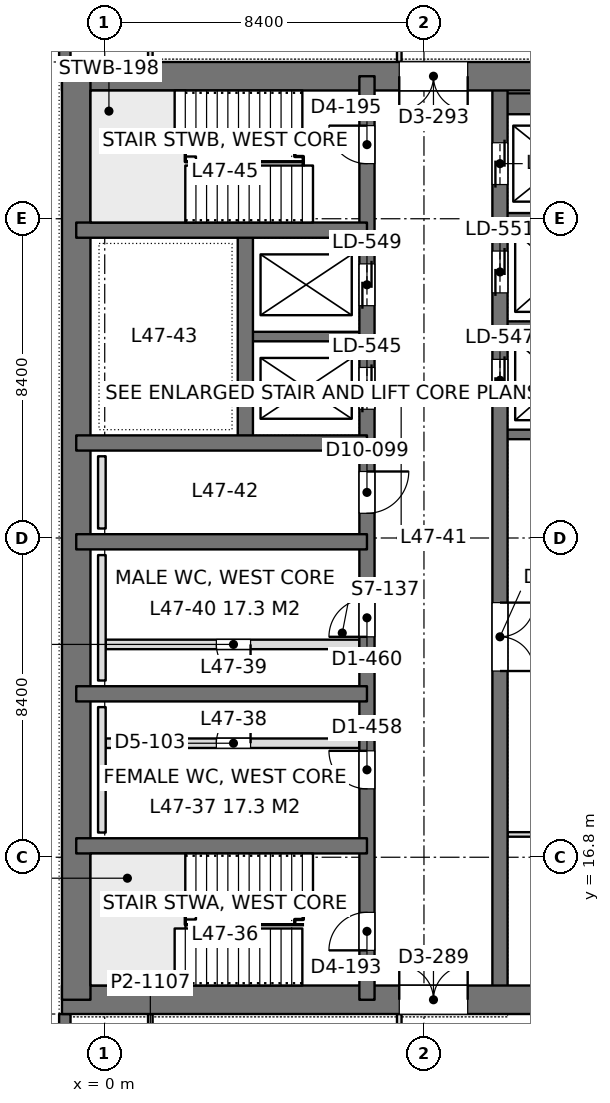
"""IFC4 building model, lengths in metres.
Left out: names, types, materials, properties, quantities, classifications, styles, units other than length and angle.
Written with IfcOpenShell. Run it as: python <this file> out.ifc"""

import sys

from ifc_helpers import new_model, si_unit, direction, frame, frame_2d, origin, place, context, subcontext, project, spatial, rectangle, extrude, element, fill, save


model = new_model("IFC4")
c1 = context("Model", 3, precision=1e-05, world=origin(), true_north=direction((0.0, 1.0)))
c2 = subcontext(c1, "Body", "Model", "MODEL_VIEW")
j1 = project(units=[si_unit("LENGTHUNIT", "METRE"), si_unit("PLANEANGLEUNIT", "RADIAN")], contexts=[c1])
p1 = place(None, origin())
s1 = spatial("IfcSite", under=j1, at=p1, CompositionType="ELEMENT")
p2 = place(p1, origin())
s2 = spatial("IfcBuilding", under=s1, at=p2, CompositionType="ELEMENT")
p3 = place(p2, frame((0.0, 0.0, 207.0)))
s3 = spatial("IfcBuildingStorey", under=s2, at=p3, CompositionType="ELEMENT", Elevation=207.0)
p4 = place(p3, frame((-1.125, 13.05, 0.0), z_axis=(0.0, 0.0, 1.0), x_axis=(1.0, 0.0, 0.0)))
e1 = element("IfcWall", 1, at=p4, inside=s3, PredefinedType="SHEAR", context=c2, shape_type="SweptSolid", body=[
    extrude(rectangle(XDim=17.85, YDim=0.75, at=frame_2d((8.925, 0.0))), origin(), (0.0, 0.0, 1.0), 4.2),
])
p5 = place(p4, frame((8.875, 0.0, 0.0)))
e2 = element("IfcOpeningElement", 2, at=p5, cuts=e1, PredefinedType="OPENING", context=c2, shape_type="SweptSolid", body=[
    extrude(rectangle(XDim=1.8, YDim=2.4, at=frame_2d((0.9, 1.2))), frame((0.0, 0.385, 0.0), z_axis=(0.0, -1.0, 0.0), x_axis=(1.0, 0.0, 0.0)), (0.0, 0.0, 1.0), 0.77),
])
p6 = place(p3, frame((-1.125, 37.35, 0.0), z_axis=(0.0, 0.0, 1.0), x_axis=(1.0, 0.0, 0.0)))
e3 = element("IfcWall", 3, at=p6, inside=s3, PredefinedType="SHEAR", context=c2, shape_type="SweptSolid", body=[
    extrude(rectangle(XDim=17.85, YDim=0.75, at=frame_2d((8.925, 0.0))), origin(), (0.0, 0.0, 1.0), 4.2),
])
p7 = place(p6, frame((8.875, 0.0, 0.0)))
e4 = element("IfcOpeningElement", 4, at=p7, cuts=e3, PredefinedType="OPENING", context=c2, shape_type="SweptSolid", body=[
    extrude(rectangle(XDim=1.8, YDim=2.4, at=frame_2d((0.9, 1.2))), frame((0.0, 0.385, 0.0), z_axis=(0.0, -1.0, 0.0), x_axis=(1.0, 0.0, 0.0)), (0.0, 0.0, 1.0), 0.77),
])
p8 = place(p3, frame((-0.75, 13.05, 0.0), z_axis=(0.0, 0.0, 1.0), x_axis=(0.0, 1.0, 0.0)))
e5 = element("IfcWall", 5, at=p8, inside=s3, PredefinedType="SHEAR", context=c2, shape_type="SweptSolid", body=[
    extrude(rectangle(XDim=24.3, YDim=0.75, at=frame_2d((12.15, 0.0))), origin(), (0.0, 0.0, 1.0), 4.2),
])
p9 = place(p3, frame((6.9, 13.05, 0.0), z_axis=(0.0, 0.0, 1.0), x_axis=(0.0, 1.0, 0.0)))
e6 = element("IfcWall", 6, at=p9, inside=s3, PredefinedType="SHEAR", context=c2, shape_type="SweptSolid", body=[
    extrude(rectangle(XDim=24.3, YDim=0.4, at=frame_2d((12.15, 0.0))), origin(), (0.0, 0.0, 1.0), 4.2),
])
p10 = place(p9, frame((1.3, 0.0, 0.0)))
e7 = element("IfcOpeningElement", 7, at=p10, cuts=e6, PredefinedType="OPENING", context=c2, shape_type="SweptSolid", body=[
    extrude(rectangle(XDim=1.0, YDim=2.2, at=frame_2d((0.5, 1.1))), frame((0.0, 0.21, 0.0), z_axis=(0.0, -1.0, 0.0), x_axis=(1.0, 0.0, 0.0)), (0.0, 0.0, 1.0), 0.42),
])
p11 = place(p9, frame((22.0, 0.0, 0.0)))
e8 = element("IfcOpeningElement", 8, at=p11, cuts=e6, PredefinedType="OPENING", context=c2, shape_type="SweptSolid", body=[
    extrude(rectangle(XDim=1.0, YDim=2.2, at=frame_2d((0.5, 1.1))), frame((0.0, 0.21, 0.0), z_axis=(0.0, -1.0, 0.0), x_axis=(1.0, 0.0, 0.0)), (0.0, 0.0, 1.0), 0.42),
])
p12 = place(p9, frame((5.55, 0.0, 0.0)))
e9 = element("IfcOpeningElement", 9, at=p12, cuts=e6, PredefinedType="OPENING", context=c2, shape_type="SweptSolid", body=[
    extrude(rectangle(XDim=1.0, YDim=2.2, at=frame_2d((0.5, 1.1))), frame((0.0, 0.21, 0.0), z_axis=(0.0, -1.0, 0.0), x_axis=(1.0, 0.0, 0.0)), (0.0, 0.0, 1.0), 0.42),
])
p13 = place(p9, frame((9.55, 0.0, 0.0)))
e10 = element("IfcOpeningElement", 10, at=p13, cuts=e6, PredefinedType="OPENING", context=c2, shape_type="SweptSolid", body=[
    extrude(rectangle(XDim=1.0, YDim=2.2, at=frame_2d((0.5, 1.1))), frame((0.0, 0.21, 0.0), z_axis=(0.0, -1.0, 0.0), x_axis=(1.0, 0.0, 0.0)), (0.0, 0.0, 1.0), 0.42),
])
p14 = place(p9, frame((12.8, 0.0, 0.0)))
e11 = element("IfcOpeningElement", 11, at=p14, cuts=e6, PredefinedType="OPENING", context=c2, shape_type="SweptSolid", body=[
    extrude(rectangle(XDim=1.1, YDim=2.2, at=frame_2d((0.55, 1.1))), frame((0.0, 0.21, 0.0), z_axis=(0.0, -1.0, 0.0), x_axis=(1.0, 0.0, 0.0)), (0.0, 0.0, 1.0), 0.42),
])
p15 = place(p9, frame((15.538, 0.0, 0.0)))
e12 = element("IfcOpeningElement", 12, at=p15, cuts=e6, PredefinedType="OPENING", context=c2, shape_type="SweptSolid", body=[
    extrude(rectangle(XDim=1.1, YDim=2.2, at=frame_2d((0.55, 1.1))), frame((0.0, 0.21, 0.0), z_axis=(0.0, -1.0, 0.0), x_axis=(1.0, 0.0, 0.0)), (0.0, 0.0, 1.0), 0.42),
])
p16 = place(p9, frame((18.262, 0.0, 0.0)))
e13 = element("IfcOpeningElement", 13, at=p16, cuts=e6, PredefinedType="OPENING", context=c2, shape_type="SweptSolid", body=[
    extrude(rectangle(XDim=1.1, YDim=2.2, at=frame_2d((0.55, 1.1))), frame((0.0, 0.21, 0.0), z_axis=(0.0, -1.0, 0.0), x_axis=(1.0, 0.0, 0.0)), (0.0, 0.0, 1.0), 0.42),
])
p17 = place(p3, frame((10.4, 13.05, 0.0), z_axis=(0.0, 0.0, 1.0), x_axis=(0.0, 1.0, 0.0)))
e14 = element("IfcWall", 14, at=p17, inside=s3, PredefinedType="SHEAR", context=c2, shape_type="SweptSolid", body=[
    extrude(rectangle(XDim=24.3, YDim=0.4, at=frame_2d((12.15, 0.0))), origin(), (0.0, 0.0, 1.0), 4.2),
])
p18 = place(p17, frame((15.75, 0.0, 0.0)))
e15 = element("IfcOpeningElement", 15, at=p18, cuts=e14, PredefinedType="OPENING", context=c2, shape_type="SweptSolid", body=[
    extrude(rectangle(XDim=1.1, YDim=2.2, at=frame_2d((0.55, 1.1))), frame((0.0, 0.21, 0.0), z_axis=(0.0, -1.0, 0.0), x_axis=(1.0, 0.0, 0.0)), (0.0, 0.0, 1.0), 0.42),
])
p19 = place(p17, frame((18.6, 0.0, 0.0)))
e16 = element("IfcOpeningElement", 16, at=p19, cuts=e14, PredefinedType="OPENING", context=c2, shape_type="SweptSolid", body=[
    extrude(rectangle(XDim=1.1, YDim=2.2, at=frame_2d((0.55, 1.1))), frame((0.0, 0.21, 0.0), z_axis=(0.0, -1.0, 0.0), x_axis=(1.0, 0.0, 0.0)), (0.0, 0.0, 1.0), 0.42),
])
p20 = place(p17, frame((21.45, 0.0, 0.0)))
e17 = element("IfcOpeningElement", 17, at=p20, cuts=e14, PredefinedType="OPENING", context=c2, shape_type="SweptSolid", body=[
    extrude(rectangle(XDim=1.1, YDim=2.2, at=frame_2d((0.55, 1.1))), frame((0.0, 0.21, 0.0), z_axis=(0.0, -1.0, 0.0), x_axis=(1.0, 0.0, 0.0)), (0.0, 0.0, 1.0), 0.42),
])
p21 = place(p17, frame((8.65, 0.0, 0.0)))
e18 = element("IfcOpeningElement", 18, at=p21, cuts=e14, PredefinedType="OPENING", context=c2, shape_type="SweptSolid", body=[
    extrude(rectangle(XDim=1.8, YDim=2.4, at=frame_2d((0.9, 1.2))), frame((0.0, 0.21, 0.0), z_axis=(0.0, -1.0, 0.0), x_axis=(1.0, 0.0, 0.0)), (0.0, 0.0, 1.0), 0.42),
])
for number, where, z_axis, x_axis in (
    (19, (-0.75, 17.1, 0.0), (0.0, 0.0, 1.0), (1.0, 0.0, 0.0)),
    (20, (-0.75, 21.1, 0.0), (0.0, 0.0, 1.0), (1.0, 0.0, 0.0)),
    (21, (-0.75, 25.1, 0.0), (0.0, 0.0, 1.0), (1.0, 0.0, 0.0)),
    (22, (-0.75, 27.7, 0.0), (0.0, 0.0, 1.0), (1.0, 0.0, 0.0)),
    (23, (-0.75, 33.3, 0.0), (0.0, 0.0, 1.0), (1.0, 0.0, 0.0)),
):
    element("IfcWall", number, at=place(p3, frame(where, z_axis=z_axis, x_axis=x_axis)), inside=s3, PredefinedType="SHEAR", context=c2, shape_type="SweptSolid", body=[
        extrude(rectangle(XDim=7.65, YDim=0.4, at=frame_2d((3.825, 0.0))), origin(), (0.0, 0.0, 1.0), 4.2),
    ])
p22 = place(p3, frame((3.7, 27.7, 0.0), z_axis=(0.0, 0.0, 1.0), x_axis=(0.0, 1.0, 0.0)))
e24 = element("IfcWall", 24, at=p22, inside=s3, PredefinedType="SHEAR", context=c2, shape_type="SweptSolid", body=[
    extrude(rectangle(XDim=5.6, YDim=0.4, at=frame_2d((2.8, 0.0))), origin(), (0.0, 0.0, 1.0), 4.2),
])
p23 = place(p3, frame((3.7, 30.5, 0.0), z_axis=(0.0, 0.0, 1.0), x_axis=(1.0, 0.0, 0.0)))
e25 = element("IfcWall", 25, at=p23, inside=s3, PredefinedType="SHEAR", context=c2, shape_type="SweptSolid", body=[
    extrude(rectangle(XDim=3.2, YDim=0.25, at=frame_2d((1.6, 0.0))), origin(), (0.0, 0.0, 1.0), 4.2),
])
p24 = place(p3, frame((10.4, 27.925, 0.0), z_axis=(0.0, 0.0, 1.0), x_axis=(1.0, 0.0, 0.0)))
e26 = element("IfcWall", 26, at=p24, inside=s3, PredefinedType="SHEAR", context=c2, shape_type="SweptSolid", body=[
    extrude(rectangle(XDim=5.95, YDim=0.25, at=frame_2d((2.975, 0.0))), origin(), (0.0, 0.0, 1.0), 4.2),
])
for number, where, z_axis, x_axis in (
    (27, (10.4, 30.775, 0.0), (0.0, 0.0, 1.0), (1.0, 0.0, 0.0)),
    (28, (10.4, 33.625, 0.0), (0.0, 0.0, 1.0), (1.0, 0.0, 0.0)),
):
    element("IfcWall", number, at=place(p3, frame(where, z_axis=z_axis, x_axis=x_axis)), inside=s3, PredefinedType="SHEAR", context=c2, shape_type="SweptSolid", body=[
        extrude(rectangle(XDim=3.2, YDim=0.25, at=frame_2d((1.6, 0.0))), origin(), (0.0, 0.0, 1.0), 4.2),
    ])
p25 = place(p3, frame((10.4, 36.625, 0.0), z_axis=(0.0, 0.0, 1.0), x_axis=(1.0, 0.0, 0.0)))
e29 = element("IfcWall", 29, at=p25, inside=s3, PredefinedType="SHEAR", context=c2, shape_type="SweptSolid", body=[
    extrude(rectangle(XDim=3.2, YDim=0.55, at=frame_2d((1.6, 0.0))), origin(), (0.0, 0.0, 1.0), 4.2),
])
p26 = place(p3, frame((-1.05, 8.4, 0.0), z_axis=(0.0, 0.0, 1.0), x_axis=(0.0, 1.0, 0.0)))
e30 = element("IfcWall", 30, at=p26, inside=s3, PredefinedType="SOLIDWALL", context=c2, shape_type="SweptSolid", body=[
    extrude(rectangle(XDim=4.275, YDim=0.3, at=frame_2d((2.138, 0.0))), origin(), (0.0, 0.0, 1.0), 4.05),
])
p27 = place(p26, frame((0.938, 0.0, 0.9)))
e31 = element("IfcOpeningElement", 31, at=p27, cuts=e30, PredefinedType="OPENING", context=c2, shape_type="SweptSolid", body=[
    extrude(rectangle(XDim=2.4, YDim=1.9, at=frame_2d((1.2, 0.95))), frame((0.0, 0.16, 0.0), z_axis=(0.0, -1.0, 0.0), x_axis=(1.0, 0.0, 0.0)), (0.0, 0.0, 1.0), 0.32),
])
p28 = place(p3, frame((-1.05, 37.725, 0.0), z_axis=(0.0, 0.0, 1.0), x_axis=(0.0, 1.0, 0.0)))
e32 = element("IfcWall", 32, at=p28, inside=s3, PredefinedType="SOLIDWALL", context=c2, shape_type="SweptSolid", body=[
    extrude(rectangle(XDim=4.275, YDim=0.3, at=frame_2d((2.137, 0.0))), origin(), (0.0, 0.0, 1.0), 4.05),
])
p29 = place(p28, frame((0.938, 0.0, 0.9)))
e33 = element("IfcOpeningElement", 33, at=p29, cuts=e32, PredefinedType="OPENING", context=c2, shape_type="SweptSolid", body=[
    extrude(rectangle(XDim=2.4, YDim=1.9, at=frame_2d((1.2, 0.95))), frame((0.0, 0.16, 0.0), z_axis=(0.0, -1.0, 0.0), x_axis=(1.0, 0.0, 0.0)), (0.0, 0.0, 1.0), 0.32),
])
p30 = place(p3, frame((10.598, 17.4, 0.0), z_axis=(0.0, 0.0, 1.0), x_axis=(1.0, 0.0, 0.0)))
e34 = element("IfcWall", 34, at=p30, inside=s3, PredefinedType="PARTITIONING", context=c2, shape_type="SweptSolid", body=[
    extrude(rectangle(XDim=5.904, YDim=0.12, at=frame_2d((2.952, 0.0))), origin(), (0.0, 0.0, 1.0), 3.55),
])
p31 = place(p3, frame((7.75, 11.158, 0.0), z_axis=(0.0, 0.0, 1.0), x_axis=(0.0, 1.0, 0.0)))
e35 = element("IfcWall", 35, at=p31, inside=s3, PredefinedType="PARTITIONING", context=c2, shape_type="SweptSolid", body=[
    extrude(rectangle(XDim=1.518, YDim=0.12, at=frame_2d((0.759, 0.0))), origin(), (0.0, 0.0, 1.0), 4.05),
])
p32 = place(p31, frame((0.192, 0.0, 0.0)))
e36 = element("IfcOpeningElement", 36, at=p32, cuts=e35, PredefinedType="OPENING", context=c2, shape_type="SweptSolid", body=[
    extrude(rectangle(XDim=1.0, YDim=2.4, at=frame_2d((0.5, 1.2))), frame((0.0, 0.07, 0.0), z_axis=(0.0, -1.0, 0.0), x_axis=(1.0, 0.0, 0.0)), (0.0, 0.0, 1.0), 0.14),
])
p33 = place(p3, frame((1.2, 11.1, 0.0), z_axis=(0.0, 0.0, 1.0), x_axis=(0.0, 1.0, 0.0)))
e37 = element("IfcWall", 37, at=p33, inside=s3, PredefinedType="PARTITIONING", context=c2, shape_type="SweptSolid", body=[
    extrude(rectangle(XDim=1.576, YDim=0.12, at=frame_2d((0.788, 0.0))), origin(), (0.0, 0.0, 1.0), 4.05),
])
p34 = place(p3, frame((7.75, 37.724, 0.0), z_axis=(0.0, 0.0, 1.0), x_axis=(0.0, 1.0, 0.0)))
e38 = element("IfcWall", 38, at=p34, inside=s3, PredefinedType="PARTITIONING", context=c2, shape_type="SweptSolid", body=[
    extrude(rectangle(XDim=1.518, YDim=0.12, at=frame_2d((0.759, 0.0))), origin(), (0.0, 0.0, 1.0), 4.05),
])
p35 = place(p34, frame((0.326, 0.0, 0.0)))
e39 = element("IfcOpeningElement", 39, at=p35, cuts=e38, PredefinedType="OPENING", context=c2, shape_type="SweptSolid", body=[
    extrude(rectangle(XDim=1.0, YDim=2.4, at=frame_2d((0.5, 1.2))), frame((0.0, 0.07, 0.0), z_axis=(0.0, -1.0, 0.0), x_axis=(1.0, 0.0, 0.0)), (0.0, 0.0, 1.0), 0.14),
])
p36 = place(p3, frame((1.2, 37.724, 0.0), z_axis=(0.0, 0.0, 1.0), x_axis=(0.0, 1.0, 0.0)))
e40 = element("IfcWall", 40, at=p36, inside=s3, PredefinedType="PARTITIONING", context=c2, shape_type="SweptSolid", body=[
    extrude(rectangle(XDim=1.576, YDim=0.12, at=frame_2d((0.788, 0.0))), origin(), (0.0, 0.0, 1.0), 4.05),
])
p37 = place(p3, frame((0.025, 22.4, 0.0), z_axis=(0.0, 0.0, 1.0), x_axis=(1.0, 0.0, 0.0)))
e41 = element("IfcWall", 41, at=p37, inside=s3, PredefinedType="PARTITIONING", context=c2, shape_type="SweptSolid", body=[
    extrude(rectangle(XDim=6.675, YDim=0.25, at=frame_2d((3.337, 0.0))), origin(), (0.0, 0.0, 1.0), 4.0),
])
p38 = place(p37, frame((2.913, 0.0, 0.0)))
e42 = element("IfcOpeningElement", 42, at=p38, cuts=e41, PredefinedType="OPENING", context=c2, shape_type="SweptSolid", body=[
    extrude(rectangle(XDim=0.9, YDim=2.2, at=frame_2d((0.45, 1.1))), frame((0.0, 0.135, 0.0), z_axis=(0.0, -1.0, 0.0), x_axis=(1.0, 0.0, 0.0)), (0.0, 0.0, 1.0), 0.27),
])
p39 = place(p3, frame((0.025, 19.8, 0.0), z_axis=(0.0, 0.0, 1.0), x_axis=(1.0, 0.0, 0.0)))
e43 = element("IfcWall", 43, at=p39, inside=s3, PredefinedType="PARTITIONING", context=c2, shape_type="SweptSolid", body=[
    extrude(rectangle(XDim=6.675, YDim=0.25, at=frame_2d((3.337, 0.0))), origin(), (0.0, 0.0, 1.0), 4.0),
])
p40 = place(p39, frame((2.913, 0.0, 0.0)))
e44 = element("IfcOpeningElement", 44, at=p40, cuts=e43, PredefinedType="OPENING", context=c2, shape_type="SweptSolid", body=[
    extrude(rectangle(XDim=0.9, YDim=2.2, at=frame_2d((0.45, 1.1))), frame((0.0, 0.135, 0.0), z_axis=(0.0, -1.0, 0.0), x_axis=(1.0, 0.0, 0.0)), (0.0, 0.0, 1.0), 0.27),
])
for number, where, z_axis, x_axis in (
    (45, (-0.075, 17.45, 0.0), (0.0, 0.0, 1.0), (0.0, 1.0, 0.0)),
    (46, (-0.075, 21.45, 0.0), (0.0, 0.0, 1.0), (0.0, 1.0, 0.0)),
):
    element("IfcWall", number, at=place(p3, frame(where, z_axis=z_axis, x_axis=x_axis)), inside=s3, PredefinedType="PLUMBINGWALL", context=c2, shape_type="SweptSolid", body=[
        extrude(rectangle(XDim=3.3, YDim=0.2, at=frame_2d((1.65, 0.0))), origin(), (0.0, 0.0, 1.0), 1.2),
    ])
p41 = place(p3, frame((-0.075, 25.45, 0.0), z_axis=(0.0, 0.0, 1.0), x_axis=(0.0, 1.0, 0.0)))
e47 = element("IfcWall", 47, at=p41, inside=s3, PredefinedType="PLUMBINGWALL", context=c2, shape_type="SweptSolid", body=[
    extrude(rectangle(XDim=1.9, YDim=0.2, at=frame_2d((0.95, 0.0))), origin(), (0.0, 0.0, 1.0), 1.2),
])
p42 = place(p5, origin())
e48 = element("IfcDoor", 48, at=p42, inside=s3, OperationType="DOUBLE_DOOR_SINGLE_SWING", PredefinedType="DOOR", context=c2, shape_type="SweptSolid", body=[
    extrude(rectangle(XDim=1.8, YDim=2.4, at=frame_2d((0.9, 1.2))), frame((0.0, 0.025, 0.0), z_axis=(0.0, -1.0, 0.0), x_axis=(1.0, 0.0, 0.0)), (0.0, 0.0, 1.0), 0.05),
])
fill(e2, e48)
p43 = place(p7, frame((1.8, 0.0, 0.0), z_axis=(0.0, 0.0, 1.0), x_axis=(-1.0, 0.0, 0.0)))
e49 = element("IfcDoor", 49, at=p43, inside=s3, OperationType="DOUBLE_DOOR_SINGLE_SWING", PredefinedType="DOOR", context=c2, shape_type="SweptSolid", body=[
    extrude(rectangle(XDim=1.8, YDim=2.4, at=frame_2d((0.9, 1.2))), frame((0.0, 0.025, 0.0), z_axis=(0.0, -1.0, 0.0), x_axis=(1.0, 0.0, 0.0)), (0.0, 0.0, 1.0), 0.05),
])
fill(e4, e49)
p44 = place(p10, origin())
e50 = element("IfcDoor", 50, at=p44, inside=s3, OperationType="SINGLE_SWING_LEFT", PredefinedType="DOOR", context=c2, shape_type="SweptSolid", body=[
    extrude(rectangle(XDim=1.0, YDim=2.2, at=frame_2d((0.5, 1.1))), frame((0.0, 0.025, 0.0), z_axis=(0.0, -1.0, 0.0), x_axis=(1.0, 0.0, 0.0)), (0.0, 0.0, 1.0), 0.05),
])
fill(e7, e50)
p45 = place(p11, origin())
e51 = element("IfcDoor", 51, at=p45, inside=s3, OperationType="SINGLE_SWING_RIGHT", PredefinedType="DOOR", context=c2, shape_type="SweptSolid", body=[
    extrude(rectangle(XDim=1.0, YDim=2.2, at=frame_2d((0.5, 1.1))), frame((0.0, 0.025, 0.0), z_axis=(0.0, -1.0, 0.0), x_axis=(1.0, 0.0, 0.0)), (0.0, 0.0, 1.0), 0.05),
])
fill(e8, e51)
p46 = place(p12, origin())
e52 = element("IfcDoor", 52, at=p46, inside=s3, OperationType="SINGLE_SWING_RIGHT", PredefinedType="DOOR", context=c2, shape_type="SweptSolid", body=[
    extrude(rectangle(XDim=1.0, YDim=2.2, at=frame_2d((0.5, 1.1))), frame((0.0, 0.025, 0.0), z_axis=(0.0, -1.0, 0.0), x_axis=(1.0, 0.0, 0.0)), (0.0, 0.0, 1.0), 0.05),
])
fill(e9, e52)
p47 = place(p13, origin())
e53 = element("IfcDoor", 53, at=p47, inside=s3, OperationType="SINGLE_SWING_LEFT", PredefinedType="DOOR", context=c2, shape_type="SweptSolid", body=[
    extrude(rectangle(XDim=1.0, YDim=2.2, at=frame_2d((0.5, 1.1))), frame((0.0, 0.025, 0.0), z_axis=(0.0, -1.0, 0.0), x_axis=(1.0, 0.0, 0.0)), (0.0, 0.0, 1.0), 0.05),
])
fill(e10, e53)
p48 = place(p14, frame((1.1, 0.0, 0.0), z_axis=(0.0, 0.0, 1.0), x_axis=(-1.0, 0.0, 0.0)))
e54 = element("IfcDoor", 54, at=p48, inside=s3, OperationType="SINGLE_SWING_LEFT", PredefinedType="DOOR", context=c2, shape_type="SweptSolid", body=[
    extrude(rectangle(XDim=1.1, YDim=2.2, at=frame_2d((0.55, 1.1))), frame((0.0, 0.025, 0.0), z_axis=(0.0, -1.0, 0.0), x_axis=(1.0, 0.0, 0.0)), (0.0, 0.0, 1.0), 0.05),
])
fill(e11, e54)
p49 = place(p18, origin())
e55 = element("IfcDoor", 55, at=p49, inside=s3, OperationType="DOUBLE_DOOR_SLIDING", PredefinedType="DOOR", context=c2, shape_type="SweptSolid", body=[
    extrude(rectangle(XDim=1.1, YDim=2.2, at=frame_2d((0.55, 1.1))), frame((0.0, 0.025, 0.0), z_axis=(0.0, -1.0, 0.0), x_axis=(1.0, 0.0, 0.0)), (0.0, 0.0, 1.0), 0.05),
])
fill(e15, e55)
p50 = place(p19, origin())
e56 = element("IfcDoor", 56, at=p50, inside=s3, OperationType="DOUBLE_DOOR_SLIDING", PredefinedType="DOOR", context=c2, shape_type="SweptSolid", body=[
    extrude(rectangle(XDim=1.1, YDim=2.2, at=frame_2d((0.55, 1.1))), frame((0.0, 0.025, 0.0), z_axis=(0.0, -1.0, 0.0), x_axis=(1.0, 0.0, 0.0)), (0.0, 0.0, 1.0), 0.05),
])
fill(e16, e56)
p51 = place(p20, origin())
e57 = element("IfcDoor", 57, at=p51, inside=s3, OperationType="DOUBLE_DOOR_SLIDING", PredefinedType="DOOR", context=c2, shape_type="SweptSolid", body=[
    extrude(rectangle(XDim=1.1, YDim=2.2, at=frame_2d((0.55, 1.1))), frame((0.0, 0.025, 0.0), z_axis=(0.0, -1.0, 0.0), x_axis=(1.0, 0.0, 0.0)), (0.0, 0.0, 1.0), 0.05),
])
fill(e17, e57)
p52 = place(p15, origin())
e58 = element("IfcDoor", 58, at=p52, inside=s3, OperationType="DOUBLE_DOOR_SLIDING", PredefinedType="DOOR", context=c2, shape_type="SweptSolid", body=[
    extrude(rectangle(XDim=1.1, YDim=2.2, at=frame_2d((0.55, 1.1))), frame((0.0, 0.025, 0.0), z_axis=(0.0, -1.0, 0.0), x_axis=(1.0, 0.0, 0.0)), (0.0, 0.0, 1.0), 0.05),
])
fill(e12, e58)
p53 = place(p16, origin())
e59 = element("IfcDoor", 59, at=p53, inside=s3, OperationType="DOUBLE_DOOR_SLIDING", PredefinedType="DOOR", context=c2, shape_type="SweptSolid", body=[
    extrude(rectangle(XDim=1.1, YDim=2.2, at=frame_2d((0.55, 1.1))), frame((0.0, 0.025, 0.0), z_axis=(0.0, -1.0, 0.0), x_axis=(1.0, 0.0, 0.0)), (0.0, 0.0, 1.0), 0.05),
])
fill(e13, e59)
p54 = place(p21, frame((1.8, 0.0, 0.0), z_axis=(0.0, 0.0, 1.0), x_axis=(-1.0, 0.0, 0.0)))
e60 = element("IfcDoor", 60, at=p54, inside=s3, OperationType="DOUBLE_DOOR_SINGLE_SWING", PredefinedType="DOOR", context=c2, shape_type="SweptSolid", body=[
    extrude(rectangle(XDim=1.8, YDim=2.4, at=frame_2d((0.9, 1.2))), frame((0.0, 0.025, 0.0), z_axis=(0.0, -1.0, 0.0), x_axis=(1.0, 0.0, 0.0)), (0.0, 0.0, 1.0), 0.05),
])
fill(e18, e60)
p55 = place(p38, frame((0.9, 0.0, 0.0), z_axis=(0.0, 0.0, 1.0), x_axis=(-1.0, 0.0, 0.0)))
e61 = element("IfcDoor", 61, at=p55, inside=s3, OperationType="SINGLE_SWING_LEFT", PredefinedType="DOOR", context=c2, shape_type="SweptSolid", body=[
    extrude(rectangle(XDim=0.9, YDim=2.2, at=frame_2d((0.45, 1.1))), frame((0.0, 0.025, 0.0), z_axis=(0.0, -1.0, 0.0), x_axis=(1.0, 0.0, 0.0)), (0.0, 0.0, 1.0), 0.05),
])
fill(e42, e61)
p56 = place(p40, origin())
e62 = element("IfcDoor", 62, at=p56, inside=s3, OperationType="SINGLE_SWING_RIGHT", PredefinedType="DOOR", context=c2, shape_type="SweptSolid", body=[
    extrude(rectangle(XDim=0.9, YDim=2.2, at=frame_2d((0.45, 1.1))), frame((0.0, 0.025, 0.0), z_axis=(0.0, -1.0, 0.0), x_axis=(1.0, 0.0, 0.0)), (0.0, 0.0, 1.0), 0.05),
])
fill(e44, e62)
save(model, sys.argv[1])
